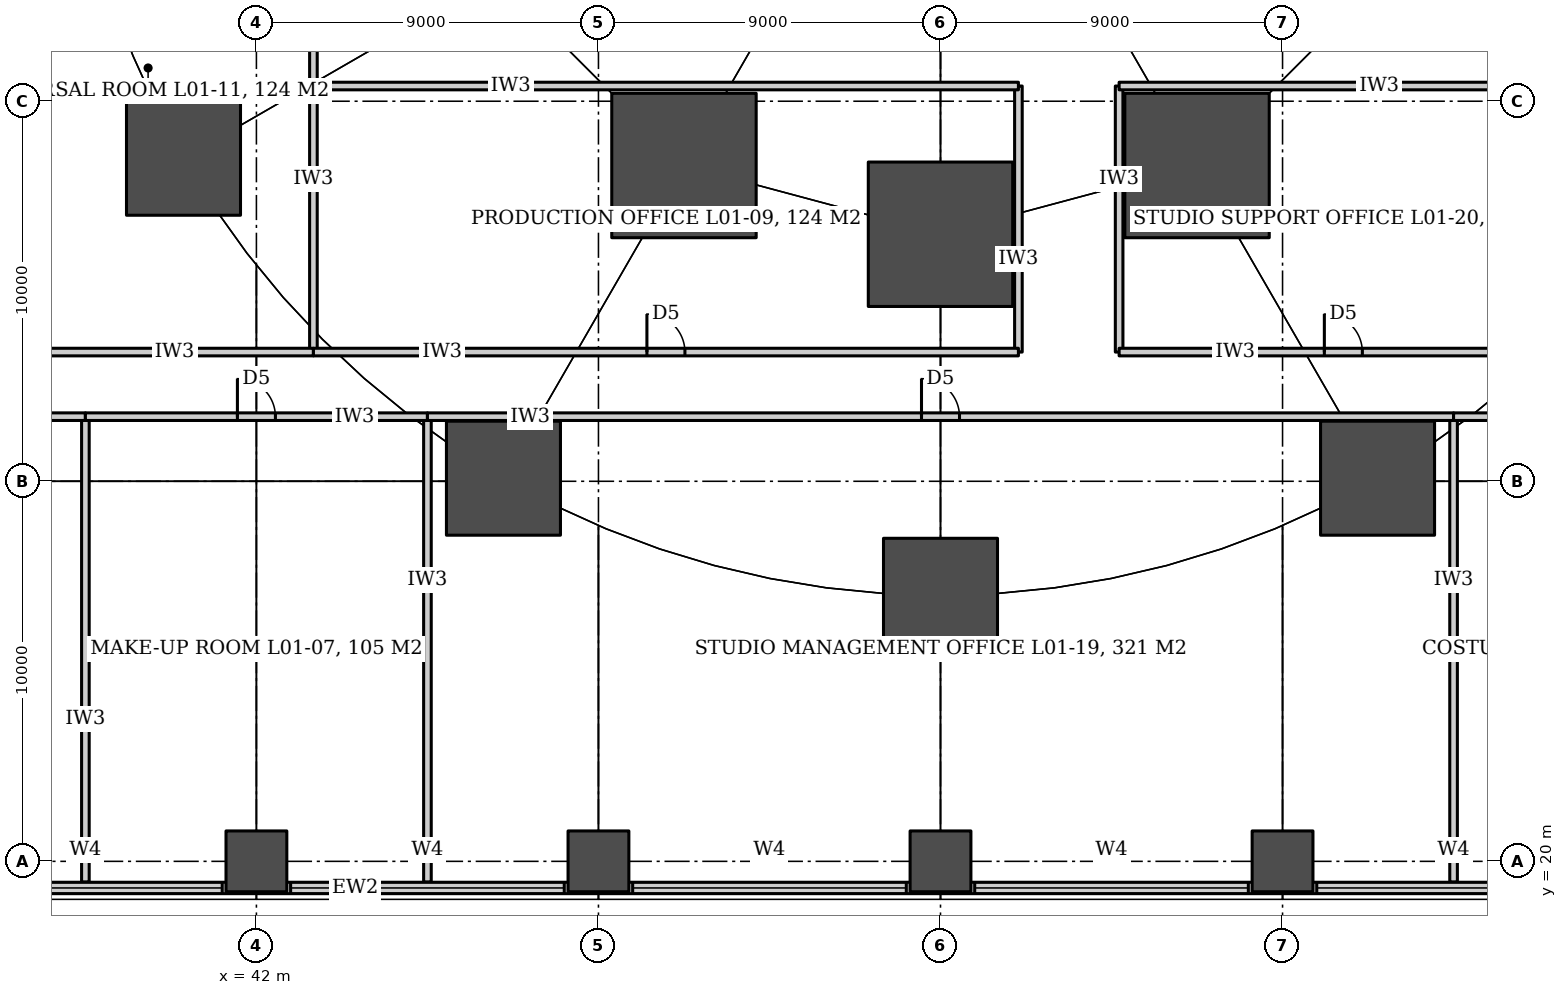
"""IFC4 building model, lengths in metres.
Left out: names, types, materials, properties, quantities, classifications, styles, units other than length and angle.
Written with IfcOpenShell. Run it as: python <this file> out.ifc"""

import sys

from ifc_helpers import new_model, si_unit, direction, frame, frame_2d, origin, origin_2d, place, context, subcontext, project, spatial, rectangle, circle, extrude, element, fill, save


model = new_model("IFC4")
c1 = context("Model", 3, precision=1e-05, world=origin(), true_north=direction((0.0, 1.0)))
c2 = subcontext(c1, "Body", "Model", "MODEL_VIEW")
j1 = project(units=[si_unit("LENGTHUNIT", "METRE"), si_unit("PLANEANGLEUNIT", "RADIAN")], contexts=[c1])
p1 = place(None, origin())
s1 = spatial("IfcSite", under=j1, at=p1, CompositionType="ELEMENT")
p2 = place(p1, origin())
s2 = spatial("IfcBuilding", under=s1, at=p2, CompositionType="ELEMENT")
p3 = place(p2, frame((0.0, 0.0, 6.0)))
s3 = spatial("IfcBuildingStorey", under=s2, at=p3, CompositionType="ELEMENT", Elevation=6.0)
for number, where, z_axis, x_axis in (
    (1, (42.0, 20.0, 0.0), (0.0, 0.0, 1.0), (1.0, 0.0, 0.0)),
    (2, (51.0, 20.0, 0.0), (0.0, 0.0, 1.0), (1.0, 0.0, 0.0)),
    (3, (60.0, 20.0, 0.0), (0.0, 0.0, 1.0), (1.0, 0.0, 0.0)),
    (4, (69.0, 20.0, 0.0), (0.0, 0.0, 1.0), (1.0, 0.0, 0.0)),
):
    element("IfcColumn", number, at=place(p3, frame(where, z_axis=z_axis, x_axis=x_axis)), inside=s3, PredefinedType="COLUMN", context=c2, shape_type="SweptSolid", body=[
        extrude(rectangle(XDim=1.6, YDim=1.6, at=origin_2d()), origin(), (0.0, 0.0, 1.0), 9.0),
    ])
for number, where, z_axis, x_axis in (
    (5, (40.081, 38.5, 0.0), (0.0, 0.0, 1.0), (1.0, 0.0, 0.0)),
    (6, (48.5, 30.081, 0.0), (0.0, 0.0, 1.0), (1.0, 0.0, 0.0)),
    (7, (60.0, 27.0, 0.0), (0.0, 0.0, 1.0), (1.0, 0.0, 0.0)),
    (8, (71.5, 30.081, 0.0), (0.0, 0.0, 1.0), (1.0, 0.0, 0.0)),
):
    element("IfcColumn", number, at=place(p3, frame(where, z_axis=z_axis, x_axis=x_axis)), inside=s3, PredefinedType="COLUMN", context=c2, shape_type="SweptSolid", body=[
        extrude(circle(Radius=1.5, at=origin_2d()), origin(), (0.0, 0.0, 1.0), 9.0),
    ])
for number, where, z_axis, x_axis in (
    (9, (53.25, 38.309, 0.0), (0.0, 0.0, 1.0), (1.0, 0.0, 0.0)),
    (10, (60.0, 36.5, 0.0), (0.0, 0.0, 1.0), (1.0, 0.0, 0.0)),
    (11, (66.75, 38.309, 0.0), (0.0, 0.0, 1.0), (1.0, 0.0, 0.0)),
):
    element("IfcColumn", number, at=place(p3, frame(where, z_axis=z_axis, x_axis=x_axis)), inside=s3, PredefinedType="COLUMN", context=c2, shape_type="SweptSolid", body=[
        extrude(circle(Radius=1.9, at=origin_2d()), origin(), (0.0, 0.0, 1.0), 9.0),
    ])
p4 = place(p3, frame((37.5, 19.455, 0.0), z_axis=(0.0, 0.0, 1.0), x_axis=(0.0, 1.0, 0.0)))
e12 = element("IfcWall", 12, at=p4, inside=s3, PredefinedType="PARTITIONING", context=c2, shape_type="SweptSolid", body=[
    extrude(rectangle(XDim=12.245, YDim=0.2, at=frame_2d((6.123, 0.0))), origin(), (0.0, 0.0, 1.0), 6.68),
])
p5 = place(p3, frame((43.5, 33.4, 0.0), z_axis=(0.0, 0.0, 1.0), x_axis=(0.0, 1.0, 0.0)))
e13 = element("IfcWall", 13, at=p5, inside=s3, PredefinedType="PARTITIONING", context=c2, shape_type="SweptSolid", body=[
    extrude(rectangle(XDim=7.0, YDim=0.2, at=frame_2d((3.5, 0.0))), origin(), (0.0, 0.0, 1.0), 6.08),
])
p6 = place(p3, frame((43.5, 40.4, 0.0), z_axis=(0.0, 0.0, 1.0), x_axis=(0.0, 1.0, 0.0)))
e14 = element("IfcWall", 14, at=p6, inside=s3, PredefinedType="PARTITIONING", context=c2, shape_type="SweptSolid", body=[
    extrude(rectangle(XDim=7.95, YDim=0.2, at=frame_2d((3.975, 0.0))), origin(), (0.0, 0.0, 1.0), 6.08),
])
p7 = place(p3, frame((46.5, 19.455, 0.0), z_axis=(0.0, 0.0, 1.0), x_axis=(0.0, 1.0, 0.0)))
e15 = element("IfcWall", 15, at=p7, inside=s3, PredefinedType="PARTITIONING", context=c2, shape_type="SweptSolid", body=[
    extrude(rectangle(XDim=12.245, YDim=0.2, at=frame_2d((6.123, 0.0))), origin(), (0.0, 0.0, 1.0), 6.68),
])
p8 = place(p3, frame((62.05, 33.4, 0.0), z_axis=(0.0, 0.0, 1.0), x_axis=(0.0, 1.0, 0.0)))
e16 = element("IfcWall", 16, at=p8, inside=s3, PredefinedType="PARTITIONING", context=c2, shape_type="SweptSolid", body=[
    extrude(rectangle(XDim=7.0, YDim=0.2, at=frame_2d((3.5, 0.0))), origin(), (0.0, 0.0, 1.0), 6.08),
])
p9 = place(p3, frame((64.7, 33.4, 0.0), z_axis=(0.0, 0.0, 1.0), x_axis=(0.0, 1.0, 0.0)))
e17 = element("IfcWall", 17, at=p9, inside=s3, PredefinedType="PARTITIONING", context=c2, shape_type="SweptSolid", body=[
    extrude(rectangle(XDim=7.0, YDim=0.2, at=frame_2d((3.5, 0.0))), origin(), (0.0, 0.0, 1.0), 5.48),
])
p10 = place(p3, frame((73.5, 19.455, 0.0), z_axis=(0.0, 0.0, 1.0), x_axis=(0.0, 1.0, 0.0)))
e18 = element("IfcWall", 18, at=p10, inside=s3, PredefinedType="PARTITIONING", context=c2, shape_type="SweptSolid", body=[
    extrude(rectangle(XDim=12.245, YDim=0.2, at=frame_2d((6.123, 0.0))), origin(), (0.0, 0.0, 1.0), 6.68),
])
p11 = place(p3, frame((14.455, 31.7, 0.0), z_axis=(0.0, 0.0, 1.0), x_axis=(1.0, 0.0, 0.0)))
e19 = element("IfcWall", 19, at=p11, inside=s3, PredefinedType="PARTITIONING", context=c2, shape_type="SweptSolid", body=[
    extrude(rectangle(XDim=23.045, YDim=0.2, at=frame_2d((11.522, 0.0))), origin(), (0.0, 0.0, 1.0), 6.68),
])
p12 = place(p11, frame((11.022, 0.0, 0.0)))
e20 = element("IfcOpeningElement", 20, at=p12, cuts=e19, PredefinedType="OPENING", context=c2, shape_type="SweptSolid", body=[
    extrude(rectangle(XDim=1.0, YDim=2.1, at=frame_2d((0.5, 1.05))), frame((0.0, 0.11, 0.0), z_axis=(0.0, -1.0, 0.0), x_axis=(1.0, 0.0, 0.0)), (0.0, 0.0, 1.0), 0.22),
])
p13 = place(p3, frame((37.5, 31.7, 0.0), z_axis=(0.0, 0.0, 1.0), x_axis=(1.0, 0.0, 0.0)))
e21 = element("IfcWall", 21, at=p13, inside=s3, PredefinedType="PARTITIONING", context=c2, shape_type="SweptSolid", body=[
    extrude(rectangle(XDim=9.0, YDim=0.2, at=frame_2d((4.5, 0.0))), origin(), (0.0, 0.0, 1.0), 6.68),
])
p14 = place(p13, frame((4.0, 0.0, 0.0)))
e22 = element("IfcOpeningElement", 22, at=p14, cuts=e21, PredefinedType="OPENING", context=c2, shape_type="SweptSolid", body=[
    extrude(rectangle(XDim=1.0, YDim=2.1, at=frame_2d((0.5, 1.05))), frame((0.0, 0.11, 0.0), z_axis=(0.0, -1.0, 0.0), x_axis=(1.0, 0.0, 0.0)), (0.0, 0.0, 1.0), 0.22),
])
p15 = place(p3, frame((46.5, 31.7, 0.0), z_axis=(0.0, 0.0, 1.0), x_axis=(1.0, 0.0, 0.0)))
e23 = element("IfcWall", 23, at=p15, inside=s3, PredefinedType="PARTITIONING", context=c2, shape_type="SweptSolid", body=[
    extrude(rectangle(XDim=27.0, YDim=0.2, at=frame_2d((13.5, 0.0))), origin(), (0.0, 0.0, 1.0), 6.08),
])
p16 = place(p15, frame((13.0, 0.0, 0.0)))
e24 = element("IfcOpeningElement", 24, at=p16, cuts=e23, PredefinedType="OPENING", context=c2, shape_type="SweptSolid", body=[
    extrude(rectangle(XDim=1.0, YDim=2.1, at=frame_2d((0.5, 1.05))), frame((0.0, 0.11, 0.0), z_axis=(0.0, -1.0, 0.0), x_axis=(1.0, 0.0, 0.0)), (0.0, 0.0, 1.0), 0.22),
])
p17 = place(p3, frame((73.5, 31.7, 0.0), z_axis=(0.0, 0.0, 1.0), x_axis=(1.0, 0.0, 0.0)))
e25 = element("IfcWall", 25, at=p17, inside=s3, PredefinedType="PARTITIONING", context=c2, shape_type="SweptSolid", body=[
    extrude(rectangle(XDim=9.0, YDim=0.2, at=frame_2d((4.5, 0.0))), origin(), (0.0, 0.0, 1.0), 6.68),
])
p18 = place(p17, frame((4.0, 0.0, 0.0)))
e26 = element("IfcOpeningElement", 26, at=p18, cuts=e25, PredefinedType="OPENING", context=c2, shape_type="SweptSolid", body=[
    extrude(rectangle(XDim=1.0, YDim=2.1, at=frame_2d((0.5, 1.05))), frame((0.0, 0.11, 0.0), z_axis=(0.0, -1.0, 0.0), x_axis=(1.0, 0.0, 0.0)), (0.0, 0.0, 1.0), 0.22),
])
p19 = place(p3, frame((34.8, 33.4, 0.0), z_axis=(0.0, 0.0, 1.0), x_axis=(1.0, 0.0, 0.0)))
e27 = element("IfcWall", 27, at=p19, inside=s3, PredefinedType="PARTITIONING", context=c2, shape_type="SweptSolid", body=[
    extrude(rectangle(XDim=8.7, YDim=0.2, at=frame_2d((4.35, 0.0))), origin(), (0.0, 0.0, 1.0), 6.68),
])
p20 = place(p3, frame((43.5, 33.4, 0.0), z_axis=(0.0, 0.0, 1.0), x_axis=(1.0, 0.0, 0.0)))
e28 = element("IfcWall", 28, at=p20, inside=s3, PredefinedType="PARTITIONING", context=c2, shape_type="SweptSolid", body=[
    extrude(rectangle(XDim=18.55, YDim=0.2, at=frame_2d((9.275, 0.0))), origin(), (0.0, 0.0, 1.0), 6.08),
])
p21 = place(p20, frame((8.775, 0.0, 0.0)))
e29 = element("IfcOpeningElement", 29, at=p21, cuts=e28, PredefinedType="OPENING", context=c2, shape_type="SweptSolid", body=[
    extrude(rectangle(XDim=1.0, YDim=2.1, at=frame_2d((0.5, 1.05))), frame((0.0, 0.11, 0.0), z_axis=(0.0, -1.0, 0.0), x_axis=(1.0, 0.0, 0.0)), (0.0, 0.0, 1.0), 0.22),
])
p22 = place(p3, frame((64.7, 33.4, 0.0), z_axis=(0.0, 0.0, 1.0), x_axis=(1.0, 0.0, 0.0)))
e30 = element("IfcWall", 30, at=p22, inside=s3, PredefinedType="PARTITIONING", context=c2, shape_type="SweptSolid", body=[
    extrude(rectangle(XDim=11.8, YDim=0.2, at=frame_2d((5.9, 0.0))), origin(), (0.0, 0.0, 1.0), 6.08),
])
p23 = place(p22, frame((5.4, 0.0, 0.0)))
e31 = element("IfcOpeningElement", 31, at=p23, cuts=e30, PredefinedType="OPENING", context=c2, shape_type="SweptSolid", body=[
    extrude(rectangle(XDim=1.0, YDim=2.1, at=frame_2d((0.5, 1.05))), frame((0.0, 0.11, 0.0), z_axis=(0.0, -1.0, 0.0), x_axis=(1.0, 0.0, 0.0)), (0.0, 0.0, 1.0), 0.22),
])
p24 = place(p3, frame((43.5, 40.4, 0.0), z_axis=(0.0, 0.0, 1.0), x_axis=(1.0, 0.0, 0.0)))
e32 = element("IfcWall", 32, at=p24, inside=s3, PredefinedType="PARTITIONING", context=c2, shape_type="SweptSolid", body=[
    extrude(rectangle(XDim=18.55, YDim=0.2, at=frame_2d((9.275, 0.0))), origin(), (0.0, 0.0, 1.0), 5.48),
])
p25 = place(p3, frame((64.7, 40.4, 0.0), z_axis=(0.0, 0.0, 1.0), x_axis=(1.0, 0.0, 0.0)))
e33 = element("IfcWall", 33, at=p25, inside=s3, PredefinedType="PARTITIONING", context=c2, shape_type="SweptSolid", body=[
    extrude(rectangle(XDim=11.8, YDim=0.2, at=frame_2d((5.9, 0.0))), origin(), (0.0, 0.0, 1.0), 5.48),
])
p26 = place(p3, frame((25.0, 19.3, 0.0), z_axis=(0.0, 0.0, 1.0), x_axis=(1.0, 0.0, 0.0)))
e34 = element("IfcWall", 34, at=p26, inside=s3, PredefinedType="SOLIDWALL", context=c2, shape_type="SweptSolid", body=[
    extrude(rectangle(XDim=70.0, YDim=0.3, at=frame_2d((35.0, 0.0))), origin(), (0.0, 0.0, 1.0), 8.7),
])
p27 = place(p26, frame((8.9, 0.0, 6.6)))
e35 = element("IfcOpeningElement", 35, at=p27, cuts=e34, PredefinedType="OPENING", context=c2, shape_type="SweptSolid", body=[
    extrude(rectangle(XDim=7.2, YDim=1.2, at=frame_2d((3.6, 0.6))), frame((0.0, 0.16, 0.0), z_axis=(0.0, -1.0, 0.0), x_axis=(1.0, 0.0, 0.0)), (0.0, 0.0, 1.0), 0.32),
])
p28 = place(p26, frame((17.9, 0.0, 6.6)))
e36 = element("IfcOpeningElement", 36, at=p28, cuts=e34, PredefinedType="OPENING", context=c2, shape_type="SweptSolid", body=[
    extrude(rectangle(XDim=7.2, YDim=1.2, at=frame_2d((3.6, 0.6))), frame((0.0, 0.16, 0.0), z_axis=(0.0, -1.0, 0.0), x_axis=(1.0, 0.0, 0.0)), (0.0, 0.0, 1.0), 0.32),
])
p29 = place(p26, frame((26.9, 0.0, 6.6)))
e37 = element("IfcOpeningElement", 37, at=p29, cuts=e34, PredefinedType="OPENING", context=c2, shape_type="SweptSolid", body=[
    extrude(rectangle(XDim=7.2, YDim=1.2, at=frame_2d((3.6, 0.6))), frame((0.0, 0.16, 0.0), z_axis=(0.0, -1.0, 0.0), x_axis=(1.0, 0.0, 0.0)), (0.0, 0.0, 1.0), 0.32),
])
p30 = place(p26, frame((35.9, 0.0, 6.6)))
e38 = element("IfcOpeningElement", 38, at=p30, cuts=e34, PredefinedType="OPENING", context=c2, shape_type="SweptSolid", body=[
    extrude(rectangle(XDim=7.2, YDim=1.2, at=frame_2d((3.6, 0.6))), frame((0.0, 0.16, 0.0), z_axis=(0.0, -1.0, 0.0), x_axis=(1.0, 0.0, 0.0)), (0.0, 0.0, 1.0), 0.32),
])
p31 = place(p26, frame((44.9, 0.0, 6.6)))
e39 = element("IfcOpeningElement", 39, at=p31, cuts=e34, PredefinedType="OPENING", context=c2, shape_type="SweptSolid", body=[
    extrude(rectangle(XDim=7.2, YDim=1.2, at=frame_2d((3.6, 0.6))), frame((0.0, 0.16, 0.0), z_axis=(0.0, -1.0, 0.0), x_axis=(1.0, 0.0, 0.0)), (0.0, 0.0, 1.0), 0.32),
])
p32 = place(p26, frame((53.9, 0.0, 6.6)))
e40 = element("IfcOpeningElement", 40, at=p32, cuts=e34, PredefinedType="OPENING", context=c2, shape_type="SweptSolid", body=[
    extrude(rectangle(XDim=7.2, YDim=1.2, at=frame_2d((3.6, 0.6))), frame((0.0, 0.16, 0.0), z_axis=(0.0, -1.0, 0.0), x_axis=(1.0, 0.0, 0.0)), (0.0, 0.0, 1.0), 0.32),
])
p33 = place(p14, origin())
e41 = element("IfcDoor", 41, at=p33, inside=s3, OperationType="SINGLE_SWING_LEFT", PredefinedType="DOOR", context=c2, shape_type="SweptSolid", body=[
    extrude(rectangle(XDim=1.0, YDim=2.1, at=frame_2d((0.5, 1.05))), frame((0.0, 0.025, 0.0), z_axis=(0.0, -1.0, 0.0), x_axis=(1.0, 0.0, 0.0)), (0.0, 0.0, 1.0), 0.05),
])
fill(e22, e41)
p34 = place(p16, origin())
e42 = element("IfcDoor", 42, at=p34, inside=s3, OperationType="SINGLE_SWING_LEFT", PredefinedType="DOOR", context=c2, shape_type="SweptSolid", body=[
    extrude(rectangle(XDim=1.0, YDim=2.1, at=frame_2d((0.5, 1.05))), frame((0.0, 0.025, 0.0), z_axis=(0.0, -1.0, 0.0), x_axis=(1.0, 0.0, 0.0)), (0.0, 0.0, 1.0), 0.05),
])
fill(e24, e42)
p35 = place(p21, origin())
e43 = element("IfcDoor", 43, at=p35, inside=s3, OperationType="SINGLE_SWING_LEFT", PredefinedType="DOOR", context=c2, shape_type="SweptSolid", body=[
    extrude(rectangle(XDim=1.0, YDim=2.1, at=frame_2d((0.5, 1.05))), frame((0.0, 0.025, 0.0), z_axis=(0.0, -1.0, 0.0), x_axis=(1.0, 0.0, 0.0)), (0.0, 0.0, 1.0), 0.05),
])
fill(e29, e43)
p36 = place(p23, origin())
e44 = element("IfcDoor", 44, at=p36, inside=s3, OperationType="SINGLE_SWING_LEFT", PredefinedType="DOOR", context=c2, shape_type="SweptSolid", body=[
    extrude(rectangle(XDim=1.0, YDim=2.1, at=frame_2d((0.5, 1.05))), frame((0.0, 0.025, 0.0), z_axis=(0.0, -1.0, 0.0), x_axis=(1.0, 0.0, 0.0)), (0.0, 0.0, 1.0), 0.05),
])
fill(e31, e44)
p37 = place(p27, origin())
e45 = element("IfcWindow", 45, at=p37, inside=s3, PartitioningType="SINGLE_PANEL", PredefinedType="WINDOW", context=c2, shape_type="SweptSolid", body=[
    extrude(rectangle(XDim=7.2, YDim=1.2, at=frame_2d((3.6, 0.6))), frame((0.0, 0.03, 0.0), z_axis=(0.0, -1.0, 0.0), x_axis=(1.0, 0.0, 0.0)), (0.0, 0.0, 1.0), 0.06),
])
fill(e35, e45)
p38 = place(p28, origin())
e46 = element("IfcWindow", 46, at=p38, inside=s3, PartitioningType="SINGLE_PANEL", PredefinedType="WINDOW", context=c2, shape_type="SweptSolid", body=[
    extrude(rectangle(XDim=7.2, YDim=1.2, at=frame_2d((3.6, 0.6))), frame((0.0, 0.03, 0.0), z_axis=(0.0, -1.0, 0.0), x_axis=(1.0, 0.0, 0.0)), (0.0, 0.0, 1.0), 0.06),
])
fill(e36, e46)
p39 = place(p29, origin())
e47 = element("IfcWindow", 47, at=p39, inside=s3, PartitioningType="SINGLE_PANEL", PredefinedType="WINDOW", context=c2, shape_type="SweptSolid", body=[
    extrude(rectangle(XDim=7.2, YDim=1.2, at=frame_2d((3.6, 0.6))), frame((0.0, 0.03, 0.0), z_axis=(0.0, -1.0, 0.0), x_axis=(1.0, 0.0, 0.0)), (0.0, 0.0, 1.0), 0.06),
])
fill(e37, e47)
p40 = place(p30, origin())
e48 = element("IfcWindow", 48, at=p40, inside=s3, PartitioningType="SINGLE_PANEL", PredefinedType="WINDOW", context=c2, shape_type="SweptSolid", body=[
    extrude(rectangle(XDim=7.2, YDim=1.2, at=frame_2d((3.6, 0.6))), frame((0.0, 0.03, 0.0), z_axis=(0.0, -1.0, 0.0), x_axis=(1.0, 0.0, 0.0)), (0.0, 0.0, 1.0), 0.06),
])
fill(e38, e48)
p41 = place(p31, origin())
e49 = element("IfcWindow", 49, at=p41, inside=s3, PartitioningType="SINGLE_PANEL", PredefinedType="WINDOW", context=c2, shape_type="SweptSolid", body=[
    extrude(rectangle(XDim=7.2, YDim=1.2, at=frame_2d((3.6, 0.6))), frame((0.0, 0.03, 0.0), z_axis=(0.0, -1.0, 0.0), x_axis=(1.0, 0.0, 0.0)), (0.0, 0.0, 1.0), 0.06),
])
fill(e39, e49)
save(model, sys.argv[1])
